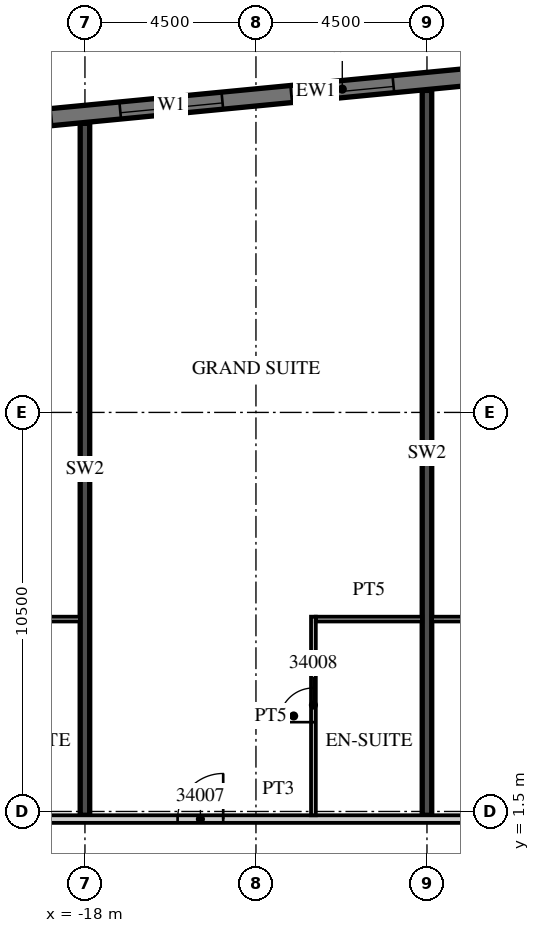
"""IFC4 building model, lengths in metres.
Left out: names, types, materials, properties, quantities, classifications, styles, units other than length and angle.
Written with IfcOpenShell. Run it as: python <this file> out.ifc"""

import sys

from ifc_helpers import new_model, si_unit, direction, frame, frame_2d, origin, place, context, subcontext, project, spatial, rectangle, extrude, element, fill, save


model = new_model("IFC4")
c1 = context("Model", 3, precision=1e-05, world=origin(), true_north=direction((0.0, 1.0)))
c2 = subcontext(c1, "Body", "Model", "MODEL_VIEW")
j1 = project(units=[si_unit("LENGTHUNIT", "METRE"), si_unit("PLANEANGLEUNIT", "RADIAN")], contexts=[c1])
p1 = place(None, origin())
s1 = spatial("IfcSite", under=j1, at=p1, CompositionType="ELEMENT")
p2 = place(p1, origin())
s2 = spatial("IfcBuilding", under=s1, at=p2, CompositionType="ELEMENT")
p3 = place(p2, frame((0.0, 0.0, 147.1)))
s3 = spatial("IfcBuildingStorey", under=s2, at=p3, CompositionType="ELEMENT", Elevation=147.1)
p4 = place(p3, frame((-18.0, 1.4, 0.0), z_axis=(0.0, 0.0, 1.0), x_axis=(0.0, 1.0, 0.0)))
e1 = element("IfcWall", 1, at=p4, inside=s3, PredefinedType="SHEAR", context=c2, shape_type="SweptSolid", body=[
    extrude(rectangle(XDim=18.207, YDim=0.25, at=frame_2d((9.104, 0.0))), origin(), (0.0, 0.0, 1.0), 3.0),
])
p5 = place(p3, frame((-9.0, 1.4, 0.0), z_axis=(0.0, 0.0, 1.0), x_axis=(0.0, 1.0, 0.0)))
e2 = element("IfcWall", 2, at=p5, inside=s3, PredefinedType="SHEAR", context=c2, shape_type="SweptSolid", body=[
    extrude(rectangle(XDim=19.073, YDim=0.25, at=frame_2d((9.537, 0.0))), origin(), (0.0, 0.0, 1.0), 3.0),
])
p6 = place(p3, frame((13.521, 22.89, 0.0), z_axis=(0.0, 0.0, 1.0), x_axis=(-0.995396445054, -0.095843190545, 0.0)))
e3 = element("IfcWall", 3, at=p6, inside=s3, PredefinedType="SOLIDWALL", context=c2, shape_type="SweptSolid", body=[
    extrude(rectangle(XDim=51.114, YDim=0.45, at=frame_2d((25.557, 0.0))), origin(), (0.0, 0.0, 1.0), 3.0),
])
p7 = place(p6, frame((0.91, 0.0, 0.45)))
e4 = element("IfcOpeningElement", 4, at=p7, cuts=e3, PredefinedType="OPENING", context=c2, shape_type="SweptSolid", body=[
    extrude(rectangle(XDim=2.7, YDim=2.25, at=frame_2d((1.35, 1.125))), frame((0.0, 0.235, 0.0), z_axis=(0.0, -1.0, 0.0), x_axis=(1.0, 0.0, 0.0)), (0.0, 0.0, 1.0), 0.47),
])
p8 = place(p6, frame((5.431, 0.0, 0.45)))
e5 = element("IfcOpeningElement", 5, at=p8, cuts=e3, PredefinedType="OPENING", context=c2, shape_type="SweptSolid", body=[
    extrude(rectangle(XDim=2.7, YDim=2.25, at=frame_2d((1.35, 1.125))), frame((0.0, 0.235, 0.0), z_axis=(0.0, -1.0, 0.0), x_axis=(1.0, 0.0, 0.0)), (0.0, 0.0, 1.0), 0.47),
])
p9 = place(p6, frame((9.952, 0.0, 0.45)))
e6 = element("IfcOpeningElement", 6, at=p9, cuts=e3, PredefinedType="OPENING", context=c2, shape_type="SweptSolid", body=[
    extrude(rectangle(XDim=2.7, YDim=2.25, at=frame_2d((1.35, 1.125))), frame((0.0, 0.235, 0.0), z_axis=(0.0, -1.0, 0.0), x_axis=(1.0, 0.0, 0.0)), (0.0, 0.0, 1.0), 0.47),
])
p10 = place(p6, frame((14.473, 0.0, 0.45)))
e7 = element("IfcOpeningElement", 7, at=p10, cuts=e3, PredefinedType="OPENING", context=c2, shape_type="SweptSolid", body=[
    extrude(rectangle(XDim=2.7, YDim=2.25, at=frame_2d((1.35, 1.125))), frame((0.0, 0.235, 0.0), z_axis=(0.0, -1.0, 0.0), x_axis=(1.0, 0.0, 0.0)), (0.0, 0.0, 1.0), 0.47),
])
p11 = place(p6, frame((18.994, 0.0, 0.45)))
e8 = element("IfcOpeningElement", 8, at=p11, cuts=e3, PredefinedType="OPENING", context=c2, shape_type="SweptSolid", body=[
    extrude(rectangle(XDim=2.7, YDim=2.25, at=frame_2d((1.35, 1.125))), frame((0.0, 0.235, 0.0), z_axis=(0.0, -1.0, 0.0), x_axis=(1.0, 0.0, 0.0)), (0.0, 0.0, 1.0), 0.47),
])
p12 = place(p6, frame((23.514, 0.0, 0.45)))
e9 = element("IfcOpeningElement", 9, at=p12, cuts=e3, PredefinedType="OPENING", context=c2, shape_type="SweptSolid", body=[
    extrude(rectangle(XDim=2.7, YDim=2.25, at=frame_2d((1.35, 1.125))), frame((0.0, 0.235, 0.0), z_axis=(0.0, -1.0, 0.0), x_axis=(1.0, 0.0, 0.0)), (0.0, 0.0, 1.0), 0.47),
])
p13 = place(p6, frame((28.035, 0.0, 0.45)))
e10 = element("IfcOpeningElement", 10, at=p13, cuts=e3, PredefinedType="OPENING", context=c2, shape_type="SweptSolid", body=[
    extrude(rectangle(XDim=2.7, YDim=2.25, at=frame_2d((1.35, 1.125))), frame((0.0, 0.235, 0.0), z_axis=(0.0, -1.0, 0.0), x_axis=(1.0, 0.0, 0.0)), (0.0, 0.0, 1.0), 0.47),
])
p14 = place(p6, frame((32.556, 0.0, 0.45)))
e11 = element("IfcOpeningElement", 11, at=p14, cuts=e3, PredefinedType="OPENING", context=c2, shape_type="SweptSolid", body=[
    extrude(rectangle(XDim=2.7, YDim=2.25, at=frame_2d((1.35, 1.125))), frame((0.0, 0.235, 0.0), z_axis=(0.0, -1.0, 0.0), x_axis=(1.0, 0.0, 0.0)), (0.0, 0.0, 1.0), 0.47),
])
p15 = place(p6, frame((37.077, 0.0, 0.45)))
e12 = element("IfcOpeningElement", 12, at=p15, cuts=e3, PredefinedType="OPENING", context=c2, shape_type="SweptSolid", body=[
    extrude(rectangle(XDim=2.7, YDim=2.25, at=frame_2d((1.35, 1.125))), frame((0.0, 0.235, 0.0), z_axis=(0.0, -1.0, 0.0), x_axis=(1.0, 0.0, 0.0)), (0.0, 0.0, 1.0), 0.47),
])
p16 = place(p6, frame((41.598, 0.0, 0.45)))
e13 = element("IfcOpeningElement", 13, at=p16, cuts=e3, PredefinedType="OPENING", context=c2, shape_type="SweptSolid", body=[
    extrude(rectangle(XDim=2.7, YDim=2.25, at=frame_2d((1.35, 1.125))), frame((0.0, 0.235, 0.0), z_axis=(0.0, -1.0, 0.0), x_axis=(1.0, 0.0, 0.0)), (0.0, 0.0, 1.0), 0.47),
])
p17 = place(p6, frame((46.118, 0.0, 0.45)))
e14 = element("IfcOpeningElement", 14, at=p17, cuts=e3, PredefinedType="OPENING", context=c2, shape_type="SweptSolid", body=[
    extrude(rectangle(XDim=2.7, YDim=2.25, at=frame_2d((1.35, 1.125))), frame((0.0, 0.235, 0.0), z_axis=(0.0, -1.0, 0.0), x_axis=(1.0, 0.0, 0.0)), (0.0, 0.0, 1.0), 0.47),
])
p18 = place(p3, frame((-39.316, 1.3, 0.0), z_axis=(0.0, 0.0, 1.0), x_axis=(1.0, 0.0, 0.0)))
e15 = element("IfcWall", 15, at=p18, inside=s3, PredefinedType="PARTITIONING", context=c2, shape_type="SweptSolid", body=[
    extrude(rectangle(XDim=52.816, YDim=0.2, at=frame_2d((26.408, 0.0))), origin(), (0.0, 0.0, 1.0), 3.0),
])
p19 = place(p18, frame((0.15, 0.0, 0.0)))
e16 = element("IfcOpeningElement", 16, at=p19, cuts=e15, PredefinedType="OPENING", context=c2, shape_type="SweptSolid", body=[
    extrude(rectangle(XDim=0.9, YDim=2.1, at=frame_2d((0.45, 1.05))), frame((0.0, 0.11, 0.0), z_axis=(0.0, -1.0, 0.0), x_axis=(1.0, 0.0, 0.0)), (0.0, 0.0, 1.0), 0.22),
])
p20 = place(p18, frame((5.754, 0.0, 0.0)))
e17 = element("IfcOpeningElement", 17, at=p20, cuts=e15, PredefinedType="OPENING", context=c2, shape_type="SweptSolid", body=[
    extrude(rectangle(XDim=1.2, YDim=2.1, at=frame_2d((0.6, 1.05))), frame((0.0, 0.11, 0.0), z_axis=(0.0, -1.0, 0.0), x_axis=(1.0, 0.0, 0.0)), (0.0, 0.0, 1.0), 0.22),
])
p21 = place(p18, frame((14.754, 0.0, 0.0)))
e18 = element("IfcOpeningElement", 18, at=p21, cuts=e15, PredefinedType="OPENING", context=c2, shape_type="SweptSolid", body=[
    extrude(rectangle(XDim=1.2, YDim=2.1, at=frame_2d((0.6, 1.05))), frame((0.0, 0.11, 0.0), z_axis=(0.0, -1.0, 0.0), x_axis=(1.0, 0.0, 0.0)), (0.0, 0.0, 1.0), 0.22),
])
p22 = place(p18, frame((23.754, 0.0, 0.0)))
e19 = element("IfcOpeningElement", 19, at=p22, cuts=e15, PredefinedType="OPENING", context=c2, shape_type="SweptSolid", body=[
    extrude(rectangle(XDim=1.2, YDim=2.1, at=frame_2d((0.6, 1.05))), frame((0.0, 0.11, 0.0), z_axis=(0.0, -1.0, 0.0), x_axis=(1.0, 0.0, 0.0)), (0.0, 0.0, 1.0), 0.22),
])
p23 = place(p18, frame((35.678, 0.0, 0.0)))
e20 = element("IfcOpeningElement", 20, at=p23, cuts=e15, PredefinedType="OPENING", context=c2, shape_type="SweptSolid", body=[
    extrude(rectangle(XDim=1.2, YDim=2.1, at=frame_2d((0.6, 1.05))), frame((0.0, 0.11, 0.0), z_axis=(0.0, -1.0, 0.0), x_axis=(1.0, 0.0, 0.0)), (0.0, 0.0, 1.0), 0.22),
])
p24 = place(p18, frame((44.678, 0.0, 0.0)))
e21 = element("IfcOpeningElement", 21, at=p24, cuts=e15, PredefinedType="OPENING", context=c2, shape_type="SweptSolid", body=[
    extrude(rectangle(XDim=1.2, YDim=2.1, at=frame_2d((0.6, 1.05))), frame((0.0, 0.11, 0.0), z_axis=(0.0, -1.0, 0.0), x_axis=(1.0, 0.0, 0.0)), (0.0, 0.0, 1.0), 0.22),
])
p25 = place(p18, frame((51.241, 0.0, 0.0)))
e22 = element("IfcOpeningElement", 22, at=p25, cuts=e15, PredefinedType="OPENING", context=c2, shape_type="SweptSolid", body=[
    extrude(rectangle(XDim=1.0, YDim=2.1, at=frame_2d((0.5, 1.05))), frame((0.0, 0.11, 0.0), z_axis=(0.0, -1.0, 0.0), x_axis=(1.0, 0.0, 0.0)), (0.0, 0.0, 1.0), 0.22),
])
p26 = place(p3, frame((-20.925, 6.562, 0.0), z_axis=(0.0, 0.0, 1.0), x_axis=(1.0, 0.0, 0.0)))
e23 = element("IfcWall", 23, at=p26, inside=s3, PredefinedType="PARTITIONING", context=c2, shape_type="SweptSolid", body=[
    extrude(rectangle(XDim=2.8, YDim=0.125, at=frame_2d((1.4, 0.0))), origin(), (0.0, 0.0, 1.0), 3.0),
])
p27 = place(p3, frame((-11.988, 1.4, 0.0), z_axis=(0.0, 0.0, 1.0), x_axis=(0.0, 1.0, 0.0)))
e24 = element("IfcWall", 24, at=p27, inside=s3, PredefinedType="PARTITIONING", context=c2, shape_type="SweptSolid", body=[
    extrude(rectangle(XDim=5.225, YDim=0.125, at=frame_2d((2.613, 0.0))), origin(), (0.0, 0.0, 1.0), 3.0),
])
p28 = place(p27, frame((2.45, 0.0, 0.0)))
e25 = element("IfcOpeningElement", 25, at=p28, cuts=e24, PredefinedType="OPENING", context=c2, shape_type="SweptSolid", body=[
    extrude(rectangle(XDim=0.9, YDim=2.1, at=frame_2d((0.45, 1.05))), frame((0.0, 0.073, 0.0), z_axis=(0.0, -1.0, 0.0), x_axis=(1.0, 0.0, 0.0)), (0.0, 0.0, 1.0), 0.145),
])
for number, where, z_axis, x_axis in (
    (26, (-11.925, 6.562, 0.0), (0.0, 0.0, 1.0), (1.0, 0.0, 0.0)),
    (27, (-8.875, 6.562, 0.0), (0.0, 0.0, 1.0), (1.0, 0.0, 0.0)),
):
    element("IfcWall", number, at=place(p3, frame(where, z_axis=z_axis, x_axis=x_axis)), inside=s3, PredefinedType="PARTITIONING", context=c2, shape_type="SweptSolid", body=[
        extrude(rectangle(XDim=2.8, YDim=0.125, at=frame_2d((1.4, 0.0))), origin(), (0.0, 0.0, 1.0), 3.0),
    ])
p29 = place(p12, origin())
e28 = element("IfcWindow", 28, at=p29, inside=s3, PartitioningType="SINGLE_PANEL", PredefinedType="WINDOW", context=c2, shape_type="SweptSolid", body=[
    extrude(rectangle(XDim=2.7, YDim=2.25, at=frame_2d((1.35, 1.125))), frame((0.0, 0.09, 0.0), z_axis=(0.0, -1.0, 0.0), x_axis=(1.0, 0.0, 0.0)), (0.0, 0.0, 1.0), 0.06),
])
fill(e9, e28)
p30 = place(p13, origin())
e29 = element("IfcWindow", 29, at=p30, inside=s3, PartitioningType="SINGLE_PANEL", PredefinedType="WINDOW", context=c2, shape_type="SweptSolid", body=[
    extrude(rectangle(XDim=2.7, YDim=2.25, at=frame_2d((1.35, 1.125))), frame((0.0, 0.09, 0.0), z_axis=(0.0, -1.0, 0.0), x_axis=(1.0, 0.0, 0.0)), (0.0, 0.0, 1.0), 0.06),
])
fill(e10, e29)
p31 = place(p22, origin())
e30 = element("IfcDoor", 30, at=p31, inside=s3, OperationType="SINGLE_SWING_RIGHT", PredefinedType="DOOR", context=c2, shape_type="SweptSolid", body=[
    extrude(rectangle(XDim=1.2, YDim=2.1, at=frame_2d((0.6, 1.05))), frame((0.0, 0.025, 0.0), z_axis=(0.0, -1.0, 0.0), x_axis=(1.0, 0.0, 0.0)), (0.0, 0.0, 1.0), 0.05),
])
fill(e19, e30)
p32 = place(p28, origin())
e31 = element("IfcDoor", 31, at=p32, inside=s3, OperationType="SINGLE_SWING_LEFT", PredefinedType="DOOR", context=c2, shape_type="SweptSolid", body=[
    extrude(rectangle(XDim=0.9, YDim=2.1, at=frame_2d((0.45, 1.05))), frame((0.0, 0.025, 0.0), z_axis=(0.0, -1.0, 0.0), x_axis=(1.0, 0.0, 0.0)), (0.0, 0.0, 1.0), 0.05),
])
fill(e25, e31)
save(model, sys.argv[1])
